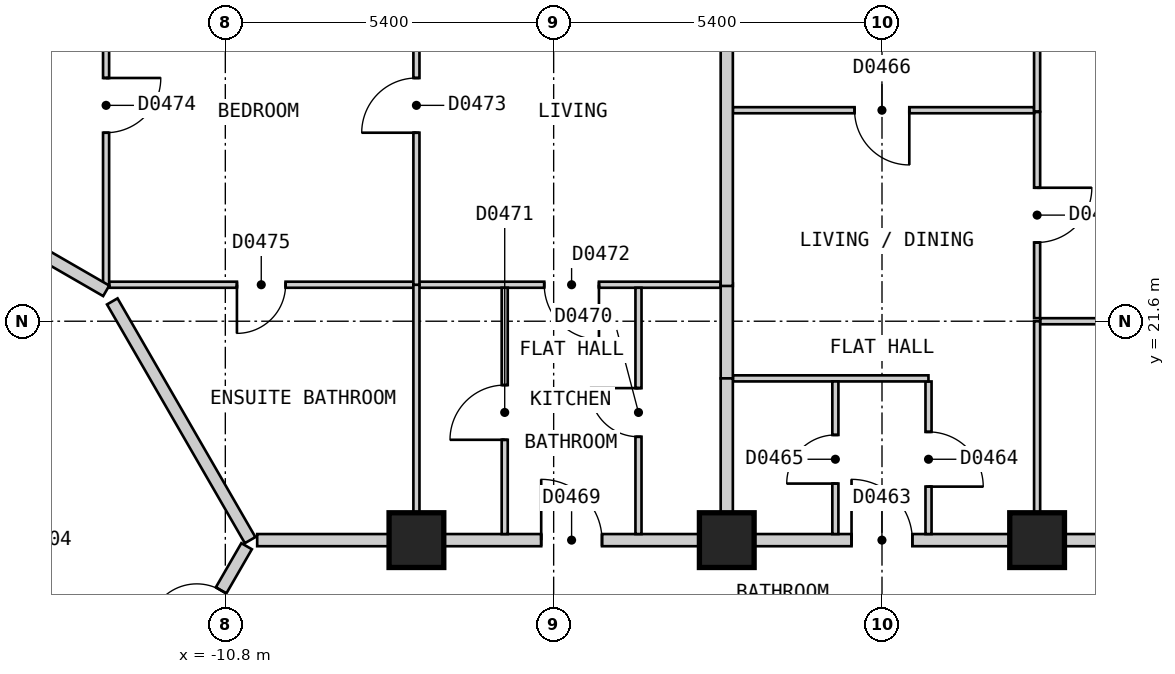
"""IFC4 building model, lengths in metres.
Left out: names, types, materials, properties, quantities, classifications, styles, units other than length and angle.
Written with IfcOpenShell. Run it as: python <this file> out.ifc"""

import sys

from ifc_helpers import new_model, si_unit, direction, frame, frame_2d, origin, origin_2d, place, context, subcontext, project, spatial, polyline, rectangle, outline, extrude, element, fill, save


model = new_model("IFC4")
c1 = context("Model", 3, precision=1e-05, world=origin(), true_north=direction((0.0, 1.0)))
c2 = subcontext(c1, "Body", "Model", "MODEL_VIEW")
j1 = project(units=[si_unit("LENGTHUNIT", "METRE"), si_unit("PLANEANGLEUNIT", "RADIAN")], contexts=[c1])
p1 = place(None, origin())
s1 = spatial("IfcSite", under=j1, at=p1, CompositionType="ELEMENT")
p2 = place(p1, origin())
s2 = spatial("IfcBuilding", under=s1, at=p2, CompositionType="ELEMENT")
p3 = place(p2, frame((0.0, 0.0, 38.4)))
s3 = spatial("IfcBuildingStorey", under=s2, at=p3, CompositionType="ELEMENT", Elevation=38.4)
for number, where, z_axis, x_axis in (
    (1, (2.551, 18.0, 0.0), (0.0, 0.0, 1.0), (-1.0, 0.0, 0.0)),
    (2, (-2.553, 18.0, 0.0), (0.0, 0.0, 1.0), (-1.0, 0.0, 0.0)),
    (3, (-7.657, 18.0, 0.0), (0.0, 0.0, 1.0), (-1.0, 0.0, 0.0)),
):
    element("IfcColumn", number, at=place(p3, frame(where, z_axis=z_axis, x_axis=x_axis)), inside=s3, PredefinedType="COLUMN", context=c2, shape_type="SweptSolid", body=[
        extrude(rectangle(XDim=0.9, YDim=0.9, at=origin_2d()), origin(), (0.0, 0.0, 1.0), 3.0),
    ])
p4 = place(p3, frame((-13.435, 28.27, 0.0), z_axis=(0.0, 0.0, 1.0), x_axis=(-0.866010750942, -0.50002537861, 0.0)))
e4 = element("IfcWall", 4, at=p4, inside=s3, PredefinedType="SOLIDWALL", context=c2, shape_type="SweptSolid", body=[
    extrude(outline(polyline([(0.0, -0.15), (5.0, -0.15), (4.919, 0.15), (0.08, 0.15), (0.0, -0.15)])), origin(), (0.0, 0.0, 1.0), 2.7),
])
p5 = place(p4, frame((0.65, 0.0, 0.15)))
e5 = element("IfcOpeningElement", 5, at=p5, cuts=e4, PredefinedType="OPENING", context=c2, shape_type="SweptSolid", body=[
    extrude(rectangle(XDim=1.2, YDim=2.1, at=frame_2d((0.6, 1.05))), frame((0.0, 0.16, 0.0), z_axis=(0.0, -1.0, 0.0), x_axis=(1.0, 0.0, 0.0)), (0.0, 0.0, 1.0), 0.32),
])
p6 = place(p3, frame((-10.276, 18.0, 0.0), z_axis=(0.0, 0.0, 1.0), x_axis=(1.0, 0.0, 0.0)))
e6 = element("IfcWall", 6, at=p6, inside=s3, PredefinedType="PARTITIONING", context=c2, shape_type="SweptSolid", body=[
    extrude(rectangle(XDim=20.5, YDim=0.2, at=frame_2d((10.25, 0.0))), origin(), (0.0, 0.0, 1.0), 2.7),
])
p7 = place(p6, frame((19.265, 0.0, 0.0)))
e7 = element("IfcOpeningElement", 7, at=p7, cuts=e6, PredefinedType="OPENING", context=c2, shape_type="SweptSolid", body=[
    extrude(rectangle(XDim=1.0, YDim=2.1, at=frame_2d((0.5, 1.05))), frame((0.0, 0.11, 0.0), z_axis=(0.0, -1.0, 0.0), x_axis=(1.0, 0.0, 0.0)), (0.0, 0.0, 1.0), 0.22),
])
p8 = place(p6, frame((9.775, 0.0, 0.0)))
e8 = element("IfcOpeningElement", 8, at=p8, cuts=e6, PredefinedType="OPENING", context=c2, shape_type="SweptSolid", body=[
    extrude(rectangle(XDim=1.0, YDim=2.1, at=frame_2d((0.5, 1.05))), frame((0.0, 0.11, 0.0), z_axis=(0.0, -1.0, 0.0), x_axis=(1.0, 0.0, 0.0)), (0.0, 0.0, 1.0), 0.22),
])
p9 = place(p6, frame((4.671, 0.0, 0.0)))
e9 = element("IfcOpeningElement", 9, at=p9, cuts=e6, PredefinedType="OPENING", context=c2, shape_type="SweptSolid", body=[
    extrude(rectangle(XDim=1.0, YDim=2.1, at=frame_2d((0.5, 1.05))), frame((0.0, 0.11, 0.0), z_axis=(0.0, -1.0, 0.0), x_axis=(1.0, 0.0, 0.0)), (0.0, 0.0, 1.0), 0.22),
])
p10 = place(p3, frame((-20.727, 0.099, 0.0), z_axis=(0.0, 0.0, 1.0), x_axis=(0.499993204491, 0.866029327138, 0.0)))
e10 = element("IfcWall", 10, at=p10, inside=s3, PredefinedType="PARTITIONING", context=c2, shape_type="SweptSolid", body=[
    extrude(rectangle(XDim=20.554, YDim=0.2, at=frame_2d((10.277, 0.0))), origin(), (0.0, 0.0, 1.0), 2.7),
])
p11 = place(p10, frame((18.916, 0.0, 0.0)))
e11 = element("IfcOpeningElement", 11, at=p11, cuts=e10, PredefinedType="OPENING", context=c2, shape_type="SweptSolid", body=[
    extrude(rectangle(XDim=0.8, YDim=2.1, at=frame_2d((0.4, 1.05))), frame((0.0, 0.11, 0.0), z_axis=(0.0, -1.0, 0.0), x_axis=(1.0, 0.0, 0.0)), (0.0, 0.0, 1.0), 0.22),
])
p12 = place(p10, frame((14.88, 0.0, 0.0)))
e12 = element("IfcOpeningElement", 12, at=p12, cuts=e10, PredefinedType="OPENING", context=c2, shape_type="SweptSolid", body=[
    extrude(rectangle(XDim=1.0, YDim=2.1, at=frame_2d((0.5, 1.05))), frame((0.0, 0.11, 0.0), z_axis=(0.0, -1.0, 0.0), x_axis=(1.0, 0.0, 0.0)), (0.0, 0.0, 1.0), 0.22),
])
p13 = place(p10, frame((9.776, 0.0, 0.0)))
e13 = element("IfcOpeningElement", 13, at=p13, cuts=e10, PredefinedType="OPENING", context=c2, shape_type="SweptSolid", body=[
    extrude(rectangle(XDim=1.0, YDim=2.1, at=frame_2d((0.5, 1.05))), frame((0.0, 0.11, 0.0), z_axis=(0.0, -1.0, 0.0), x_axis=(1.0, 0.0, 0.0)), (0.0, 0.0, 1.0), 0.22),
])
p14 = place(p10, frame((4.673, 0.0, 0.0)))
e14 = element("IfcOpeningElement", 14, at=p14, cuts=e10, PredefinedType="OPENING", context=c2, shape_type="SweptSolid", body=[
    extrude(rectangle(XDim=1.0, YDim=2.1, at=frame_2d((0.5, 1.05))), frame((0.0, 0.11, 0.0), z_axis=(0.0, -1.0, 0.0), x_axis=(1.0, 0.0, 0.0)), (0.0, 0.0, 1.0), 0.22),
])
p15 = place(p10, frame((0.838, 0.0, 0.0)))
e15 = element("IfcOpeningElement", 15, at=p15, cuts=e10, PredefinedType="OPENING", context=c2, shape_type="SweptSolid", body=[
    extrude(rectangle(XDim=0.8, YDim=2.1, at=frame_2d((0.4, 1.05))), frame((0.0, 0.11, 0.0), z_axis=(0.0, -1.0, 0.0), x_axis=(1.0, 0.0, 0.0)), (0.0, 0.0, 1.0), 0.22),
])
p16 = place(p3, frame((0.765, 20.609, 0.0), z_axis=(0.0, 0.0, 1.0), x_axis=(0.0, -1.0, 0.0)))
e16 = element("IfcWall", 16, at=p16, inside=s3, PredefinedType="PARTITIONING", context=c2, shape_type="SweptSolid", body=[
    extrude(rectangle(XDim=2.509, YDim=0.1, at=frame_2d((1.254, 0.0))), origin(), (0.0, 0.0, 1.0), 2.7),
])
p17 = place(p16, frame((0.829, 0.0, 0.0)))
e17 = element("IfcOpeningElement", 17, at=p17, cuts=e16, PredefinedType="OPENING", context=c2, shape_type="SweptSolid", body=[
    extrude(rectangle(XDim=0.9, YDim=2.1, at=frame_2d((0.45, 1.05))), frame((0.0, 0.06, 0.0), z_axis=(0.0, -1.0, 0.0), x_axis=(1.0, 0.0, 0.0)), (0.0, 0.0, 1.0), 0.12),
])
p18 = place(p3, frame((2.551, 25.04, 0.0), z_axis=(0.0, 0.0, 1.0), x_axis=(0.0, -1.0, 0.0)))
e18 = element("IfcWall", 18, at=p18, inside=s3, PredefinedType="PARTITIONING", context=c2, shape_type="SweptSolid", body=[
    extrude(rectangle(XDim=3.39, YDim=0.1, at=frame_2d((1.695, 0.0))), origin(), (0.0, 0.0, 1.0), 2.7),
])
p19 = place(p18, frame((1.245, 0.0, 0.0)))
e19 = element("IfcOpeningElement", 19, at=p19, cuts=e18, PredefinedType="OPENING", context=c2, shape_type="SweptSolid", body=[
    extrude(rectangle(XDim=0.9, YDim=2.1, at=frame_2d((0.45, 1.05))), frame((0.0, 0.06, 0.0), z_axis=(0.0, -1.0, 0.0), x_axis=(1.0, 0.0, 0.0)), (0.0, 0.0, 1.0), 0.12),
])
p20 = place(p3, frame((-2.453, 20.66, 0.0), z_axis=(0.0, 0.0, 1.0), x_axis=(1.0, 0.0, 0.0)))
e20 = element("IfcWall", 20, at=p20, inside=s3, PredefinedType="PARTITIONING", context=c2, shape_type="SweptSolid", body=[
    extrude(rectangle(XDim=3.217, YDim=0.1, at=frame_2d((1.608, 0.0))), origin(), (0.0, 0.0, 1.0), 2.7),
])
p21 = place(p3, frame((2.601, 21.6, 0.0), z_axis=(0.0, 0.0, 1.0), x_axis=(1.0, 0.0, 0.0)))
e21 = element("IfcWall", 21, at=p21, inside=s3, PredefinedType="PARTITIONING", context=c2, shape_type="SweptSolid", body=[
    extrude(rectangle(XDim=4.954, YDim=0.1, at=frame_2d((2.477, 0.0))), origin(), (0.0, 0.0, 1.0), 2.7),
])
p22 = place(p21, frame((2.102, 0.0, 0.0)))
e22 = element("IfcOpeningElement", 22, at=p22, cuts=e21, PredefinedType="OPENING", context=c2, shape_type="SweptSolid", body=[
    extrude(rectangle(XDim=0.8, YDim=2.1, at=frame_2d((0.4, 1.05))), frame((0.0, 0.06, 0.0), z_axis=(0.0, -1.0, 0.0), x_axis=(1.0, 0.0, 0.0)), (0.0, 0.0, 1.0), 0.12),
])
p23 = place(p3, frame((-12.711, 22.2, 0.0), z_axis=(0.0, 0.0, 1.0), x_axis=(1.0, 0.0, 0.0)))
e23 = element("IfcWall", 23, at=p23, inside=s3, PredefinedType="PARTITIONING", context=c2, shape_type="SweptSolid", body=[
    extrude(rectangle(XDim=10.058, YDim=0.1, at=frame_2d((5.029, 0.0))), origin(), (0.0, 0.0, 1.0), 2.7),
])
p24 = place(p23, frame((7.156, 0.0, 0.0)))
e24 = element("IfcOpeningElement", 24, at=p24, cuts=e23, PredefinedType="OPENING", context=c2, shape_type="SweptSolid", body=[
    extrude(rectangle(XDim=0.9, YDim=2.1, at=frame_2d((0.45, 1.05))), frame((0.0, 0.06, 0.0), z_axis=(0.0, -1.0, 0.0), x_axis=(1.0, 0.0, 0.0)), (0.0, 0.0, 1.0), 0.12),
])
p25 = place(p23, frame((2.102, 0.0, 0.0)))
e25 = element("IfcOpeningElement", 25, at=p25, cuts=e23, PredefinedType="OPENING", context=c2, shape_type="SweptSolid", body=[
    extrude(rectangle(XDim=0.8, YDim=2.1, at=frame_2d((0.4, 1.05))), frame((0.0, 0.06, 0.0), z_axis=(0.0, -1.0, 0.0), x_axis=(1.0, 0.0, 0.0)), (0.0, 0.0, 1.0), 0.12),
])
p26 = place(p3, frame((-2.453, 25.07, 0.0), z_axis=(0.0, 0.0, 1.0), x_axis=(1.0, 0.0, 0.0)))
e26 = element("IfcWall", 26, at=p26, inside=s3, PredefinedType="PARTITIONING", context=c2, shape_type="SweptSolid", body=[
    extrude(rectangle(XDim=4.954, YDim=0.1, at=frame_2d((2.477, 0.0))), origin(), (0.0, 0.0, 1.0), 2.7),
])
p27 = place(p26, frame((2.002, 0.0, 0.0)))
e27 = element("IfcOpeningElement", 27, at=p27, cuts=e26, PredefinedType="OPENING", context=c2, shape_type="SweptSolid", body=[
    extrude(rectangle(XDim=0.9, YDim=2.1, at=frame_2d((0.45, 1.05))), frame((0.0, 0.06, 0.0), z_axis=(0.0, -1.0, 0.0), x_axis=(1.0, 0.0, 0.0)), (0.0, 0.0, 1.0), 0.12),
])
p28 = place(p3, frame((2.551, 18.1, 0.0), z_axis=(0.0, 0.0, 1.0), x_axis=(0.0, 1.0, 0.0)))
e28 = element("IfcWall", 28, at=p28, inside=s3, PredefinedType="PARTITIONING", context=c2, shape_type="SweptSolid", body=[
    extrude(rectangle(XDim=3.5, YDim=0.1, at=frame_2d((1.75, 0.0))), origin(), (0.0, 0.0, 1.0), 2.7),
])
p29 = place(p3, frame((2.551, 25.05, 0.0), z_axis=(0.0, 0.0, 1.0), x_axis=(0.0, 1.0, 0.0)))
e29 = element("IfcWall", 29, at=p29, inside=s3, PredefinedType="PARTITIONING", context=c2, shape_type="SweptSolid", body=[
    extrude(rectangle(XDim=3.05, YDim=0.1, at=frame_2d((1.525, 0.0))), origin(), (0.0, 0.0, 1.0), 2.7),
])
p30 = place(p3, frame((-4.005, 18.1, 0.0), z_axis=(0.0, 0.0, 1.0), x_axis=(0.0, 1.0, 0.0)))
e30 = element("IfcWall", 30, at=p30, inside=s3, PredefinedType="PARTITIONING", context=c2, shape_type="SweptSolid", body=[
    extrude(rectangle(XDim=4.05, YDim=0.1, at=frame_2d((2.025, 0.0))), origin(), (0.0, 0.0, 1.0), 2.7),
])
p31 = place(p30, frame((1.6, 0.0, 0.0)))
e31 = element("IfcOpeningElement", 31, at=p31, cuts=e30, PredefinedType="OPENING", context=c2, shape_type="SweptSolid", body=[
    extrude(rectangle(XDim=0.8, YDim=2.1, at=frame_2d((0.4, 1.05))), frame((0.0, 0.06, 0.0), z_axis=(0.0, -1.0, 0.0), x_axis=(1.0, 0.0, 0.0)), (0.0, 0.0, 1.0), 0.12),
])
p32 = place(p3, frame((-6.205, 18.1, 0.0), z_axis=(0.0, 0.0, 1.0), x_axis=(0.0, 1.0, 0.0)))
e32 = element("IfcWall", 32, at=p32, inside=s3, PredefinedType="PARTITIONING", context=c2, shape_type="SweptSolid", body=[
    extrude(rectangle(XDim=4.05, YDim=0.1, at=frame_2d((2.025, 0.0))), origin(), (0.0, 0.0, 1.0), 2.7),
])
p33 = place(p32, frame((1.55, 0.0, 0.0)))
e33 = element("IfcOpeningElement", 33, at=p33, cuts=e32, PredefinedType="OPENING", context=c2, shape_type="SweptSolid", body=[
    extrude(rectangle(XDim=0.9, YDim=2.1, at=frame_2d((0.45, 1.05))), frame((0.0, 0.06, 0.0), z_axis=(0.0, -1.0, 0.0), x_axis=(1.0, 0.0, 0.0)), (0.0, 0.0, 1.0), 0.12),
])
p34 = place(p3, frame((-7.657, 18.1, 0.0), z_axis=(0.0, 0.0, 1.0), x_axis=(0.0, 1.0, 0.0)))
e34 = element("IfcWall", 34, at=p34, inside=s3, PredefinedType="PARTITIONING", context=c2, shape_type="SweptSolid", body=[
    extrude(rectangle(XDim=4.1, YDim=0.1, at=frame_2d((2.05, 0.0))), origin(), (0.0, 0.0, 1.0), 2.7),
])
p35 = place(p3, frame((-0.767, 18.1, 0.0), z_axis=(0.0, 0.0, 1.0), x_axis=(0.0, 1.0, 0.0)))
e35 = element("IfcWall", 35, at=p35, inside=s3, PredefinedType="PARTITIONING", context=c2, shape_type="SweptSolid", body=[
    extrude(rectangle(XDim=2.51, YDim=0.1, at=frame_2d((1.255, 0.0))), origin(), (0.0, 0.0, 1.0), 2.7),
])
p36 = place(p35, frame((0.83, 0.0, 0.0)))
e36 = element("IfcOpeningElement", 36, at=p36, cuts=e35, PredefinedType="OPENING", context=c2, shape_type="SweptSolid", body=[
    extrude(rectangle(XDim=0.8, YDim=2.1, at=frame_2d((0.4, 1.05))), frame((0.0, 0.06, 0.0), z_axis=(0.0, -1.0, 0.0), x_axis=(1.0, 0.0, 0.0)), (0.0, 0.0, 1.0), 0.12),
])
p37 = place(p3, frame((-12.761, 22.2, 0.0), z_axis=(0.0, 0.0, 1.0), x_axis=(0.0, 1.0, 0.0)))
e37 = element("IfcWall", 37, at=p37, inside=s3, PredefinedType="PARTITIONING", context=c2, shape_type="SweptSolid", body=[
    extrude(rectangle(XDim=5.9, YDim=0.1, at=frame_2d((2.95, 0.0))), origin(), (0.0, 0.0, 1.0), 2.7),
])
p38 = place(p37, frame((2.5, 0.0, 0.0)))
e38 = element("IfcOpeningElement", 38, at=p38, cuts=e37, PredefinedType="OPENING", context=c2, shape_type="SweptSolid", body=[
    extrude(rectangle(XDim=0.9, YDim=2.1, at=frame_2d((0.45, 1.05))), frame((0.0, 0.06, 0.0), z_axis=(0.0, -1.0, 0.0), x_axis=(1.0, 0.0, 0.0)), (0.0, 0.0, 1.0), 0.12),
])
p39 = place(p3, frame((-12.659, 21.926, 0.0), z_axis=(0.0, 0.0, 1.0), x_axis=(0.500025458316, -0.86601070492, 0.0)))
e39 = element("IfcWall", 39, at=p39, inside=s3, PredefinedType="PARTITIONING", context=c2, shape_type="SweptSolid", body=[
    extrude(rectangle(XDim=4.533, YDim=0.2, at=frame_2d((2.267, 0.0))), origin(), (0.0, 0.0, 1.0), 2.7),
])
p40 = place(p3, frame((-2.553, 22.22, 0.0), z_axis=(0.0, 0.0, 1.0), x_axis=(0.0, -1.0, 0.0)))
e40 = element("IfcWall", 40, at=p40, inside=s3, PredefinedType="PARTITIONING", context=c2, shape_type="SweptSolid", body=[
    extrude(rectangle(XDim=1.56, YDim=0.2, at=frame_2d((0.78, 0.0))), origin(), (0.0, 0.0, 1.0), 2.7),
])
p41 = place(p3, frame((-20.508, 20.679, 0.0), z_axis=(0.0, 0.0, 1.0), x_axis=(0.866047370643, -0.499961950354, 0.0)))
e41 = element("IfcWall", 41, at=p41, inside=s3, PredefinedType="PARTITIONING", context=c2, shape_type="SweptSolid", body=[
    extrude(rectangle(XDim=10.001, YDim=0.2, at=frame_2d((5.0, 0.0))), origin(), (0.0, 0.0, 1.0), 2.7),
])
p42 = place(p3, frame((-17.955, 25.099, 0.0), z_axis=(0.0, 0.0, 1.0), x_axis=(0.86609140076, -0.499885672459, 0.0)))
e42 = element("IfcWall", 42, at=p42, inside=s3, PredefinedType="PARTITIONING", context=c2, shape_type="SweptSolid", body=[
    extrude(rectangle(XDim=6.0, YDim=0.2, at=frame_2d((3.0, 0.0))), origin(), (0.0, 0.0, 1.0), 2.7),
])
p43 = place(p3, frame((-2.553, 18.1, 0.0), z_axis=(0.0, 0.0, 1.0), x_axis=(0.0, 1.0, 0.0)))
e43 = element("IfcWall", 43, at=p43, inside=s3, PredefinedType="PARTITIONING", context=c2, shape_type="SweptSolid", body=[
    extrude(rectangle(XDim=2.56, YDim=0.2, at=frame_2d((1.28, 0.0))), origin(), (0.0, 0.0, 1.0), 2.7),
])
p44 = place(p3, frame((-2.553, 22.18, 0.0), z_axis=(0.0, 0.0, 1.0), x_axis=(0.0, 1.0, 0.0)))
e44 = element("IfcWall", 44, at=p44, inside=s3, PredefinedType="PARTITIONING", context=c2, shape_type="SweptSolid", body=[
    extrude(rectangle(XDim=5.92, YDim=0.2, at=frame_2d((2.96, 0.0))), origin(), (0.0, 0.0, 1.0), 2.7),
])
p45 = place(p3, frame((-7.657, 22.2, 0.0), z_axis=(0.0, 0.0, 1.0), x_axis=(0.0, 1.0, 0.0)))
e45 = element("IfcWall", 45, at=p45, inside=s3, PredefinedType="PARTITIONING", context=c2, shape_type="SweptSolid", body=[
    extrude(rectangle(XDim=5.9, YDim=0.1, at=frame_2d((2.95, 0.0))), origin(), (0.0, 0.0, 1.0), 2.7),
])
p46 = place(p45, frame((2.5, 0.0, 0.0)))
e46 = element("IfcOpeningElement", 46, at=p46, cuts=e45, PredefinedType="OPENING", context=c2, shape_type="SweptSolid", body=[
    extrude(rectangle(XDim=0.9, YDim=2.1, at=frame_2d((0.45, 1.05))), frame((0.0, 0.06, 0.0), z_axis=(0.0, -1.0, 0.0), x_axis=(1.0, 0.0, 0.0)), (0.0, 0.0, 1.0), 0.12),
])
p47 = place(p11, origin())
e47 = element("IfcDoor", 47, at=p47, inside=s3, OperationType="SINGLE_SWING_LEFT", PredefinedType="DOOR", context=c2, shape_type="SweptSolid", body=[
    extrude(rectangle(XDim=0.8, YDim=2.1, at=frame_2d((0.4, 1.05))), frame((0.0, 0.025, 0.0), z_axis=(0.0, -1.0, 0.0), x_axis=(1.0, 0.0, 0.0)), (0.0, 0.0, 1.0), 0.05),
])
fill(e11, e47)
p48 = place(p8, origin())
e48 = element("IfcDoor", 48, at=p48, inside=s3, OperationType="SINGLE_SWING_LEFT", PredefinedType="DOOR", context=c2, shape_type="SweptSolid", body=[
    extrude(rectangle(XDim=1.0, YDim=2.1, at=frame_2d((0.5, 1.05))), frame((0.0, 0.025, 0.0), z_axis=(0.0, -1.0, 0.0), x_axis=(1.0, 0.0, 0.0)), (0.0, 0.0, 1.0), 0.05),
])
fill(e8, e48)
p49 = place(p17, origin())
e49 = element("IfcDoor", 49, at=p49, inside=s3, OperationType="SINGLE_SWING_RIGHT", PredefinedType="DOOR", context=c2, shape_type="SweptSolid", body=[
    extrude(rectangle(XDim=0.9, YDim=2.1, at=frame_2d((0.45, 1.05))), frame((0.0, 0.025, 0.0), z_axis=(0.0, -1.0, 0.0), x_axis=(1.0, 0.0, 0.0)), (0.0, 0.0, 1.0), 0.05),
])
fill(e17, e49)
p50 = place(p36, origin())
e50 = element("IfcDoor", 50, at=p50, inside=s3, OperationType="SINGLE_SWING_LEFT", PredefinedType="DOOR", context=c2, shape_type="SweptSolid", body=[
    extrude(rectangle(XDim=0.8, YDim=2.1, at=frame_2d((0.4, 1.05))), frame((0.0, 0.025, 0.0), z_axis=(0.0, -1.0, 0.0), x_axis=(1.0, 0.0, 0.0)), (0.0, 0.0, 1.0), 0.05),
])
fill(e36, e50)
p51 = place(p27, origin())
e51 = element("IfcDoor", 51, at=p51, inside=s3, OperationType="SINGLE_SWING_RIGHT", PredefinedType="DOOR", context=c2, shape_type="SweptSolid", body=[
    extrude(rectangle(XDim=0.9, YDim=2.1, at=frame_2d((0.45, 1.05))), frame((0.0, 0.025, 0.0), z_axis=(0.0, -1.0, 0.0), x_axis=(1.0, 0.0, 0.0)), (0.0, 0.0, 1.0), 0.05),
])
fill(e27, e51)
p52 = place(p19, origin())
e52 = element("IfcDoor", 52, at=p52, inside=s3, OperationType="SINGLE_SWING_LEFT", PredefinedType="DOOR", context=c2, shape_type="SweptSolid", body=[
    extrude(rectangle(XDim=0.9, YDim=2.1, at=frame_2d((0.45, 1.05))), frame((0.0, 0.025, 0.0), z_axis=(0.0, -1.0, 0.0), x_axis=(1.0, 0.0, 0.0)), (0.0, 0.0, 1.0), 0.05),
])
fill(e19, e52)
p53 = place(p9, origin())
e53 = element("IfcDoor", 53, at=p53, inside=s3, OperationType="SINGLE_SWING_LEFT", PredefinedType="DOOR", context=c2, shape_type="SweptSolid", body=[
    extrude(rectangle(XDim=1.0, YDim=2.1, at=frame_2d((0.5, 1.05))), frame((0.0, 0.025, 0.0), z_axis=(0.0, -1.0, 0.0), x_axis=(1.0, 0.0, 0.0)), (0.0, 0.0, 1.0), 0.05),
])
fill(e9, e53)
p54 = place(p31, origin())
e54 = element("IfcDoor", 54, at=p54, inside=s3, OperationType="SINGLE_SWING_RIGHT", PredefinedType="DOOR", context=c2, shape_type="SweptSolid", body=[
    extrude(rectangle(XDim=0.8, YDim=2.1, at=frame_2d((0.4, 1.05))), frame((0.0, 0.025, 0.0), z_axis=(0.0, -1.0, 0.0), x_axis=(1.0, 0.0, 0.0)), (0.0, 0.0, 1.0), 0.05),
])
fill(e31, e54)
p55 = place(p33, origin())
e55 = element("IfcDoor", 55, at=p55, inside=s3, OperationType="SINGLE_SWING_LEFT", PredefinedType="DOOR", context=c2, shape_type="SweptSolid", body=[
    extrude(rectangle(XDim=0.9, YDim=2.1, at=frame_2d((0.45, 1.05))), frame((0.0, 0.025, 0.0), z_axis=(0.0, -1.0, 0.0), x_axis=(1.0, 0.0, 0.0)), (0.0, 0.0, 1.0), 0.05),
])
fill(e33, e55)
p56 = place(p24, origin())
e56 = element("IfcDoor", 56, at=p56, inside=s3, OperationType="SINGLE_SWING_RIGHT", PredefinedType="DOOR", context=c2, shape_type="SweptSolid", body=[
    extrude(rectangle(XDim=0.9, YDim=2.1, at=frame_2d((0.45, 1.05))), frame((0.0, 0.025, 0.0), z_axis=(0.0, -1.0, 0.0), x_axis=(1.0, 0.0, 0.0)), (0.0, 0.0, 1.0), 0.05),
])
fill(e24, e56)
p57 = place(p46, origin())
e57 = element("IfcDoor", 57, at=p57, inside=s3, OperationType="SINGLE_SWING_LEFT", PredefinedType="DOOR", context=c2, shape_type="SweptSolid", body=[
    extrude(rectangle(XDim=0.9, YDim=2.1, at=frame_2d((0.45, 1.05))), frame((0.0, 0.025, 0.0), z_axis=(0.0, -1.0, 0.0), x_axis=(1.0, 0.0, 0.0)), (0.0, 0.0, 1.0), 0.05),
])
fill(e46, e57)
p58 = place(p38, origin())
e58 = element("IfcDoor", 58, at=p58, inside=s3, OperationType="SINGLE_SWING_RIGHT", PredefinedType="DOOR", context=c2, shape_type="SweptSolid", body=[
    extrude(rectangle(XDim=0.9, YDim=2.1, at=frame_2d((0.45, 1.05))), frame((0.0, 0.025, 0.0), z_axis=(0.0, -1.0, 0.0), x_axis=(1.0, 0.0, 0.0)), (0.0, 0.0, 1.0), 0.05),
])
fill(e38, e58)
p59 = place(p25, origin())
e59 = element("IfcDoor", 59, at=p59, inside=s3, OperationType="SINGLE_SWING_LEFT", PredefinedType="DOOR", context=c2, shape_type="SweptSolid", body=[
    extrude(rectangle(XDim=0.8, YDim=2.1, at=frame_2d((0.4, 1.05))), frame((0.0, 0.025, 0.0), z_axis=(0.0, -1.0, 0.0), x_axis=(1.0, 0.0, 0.0)), (0.0, 0.0, 1.0), 0.05),
])
fill(e25, e59)
save(model, sys.argv[1])
